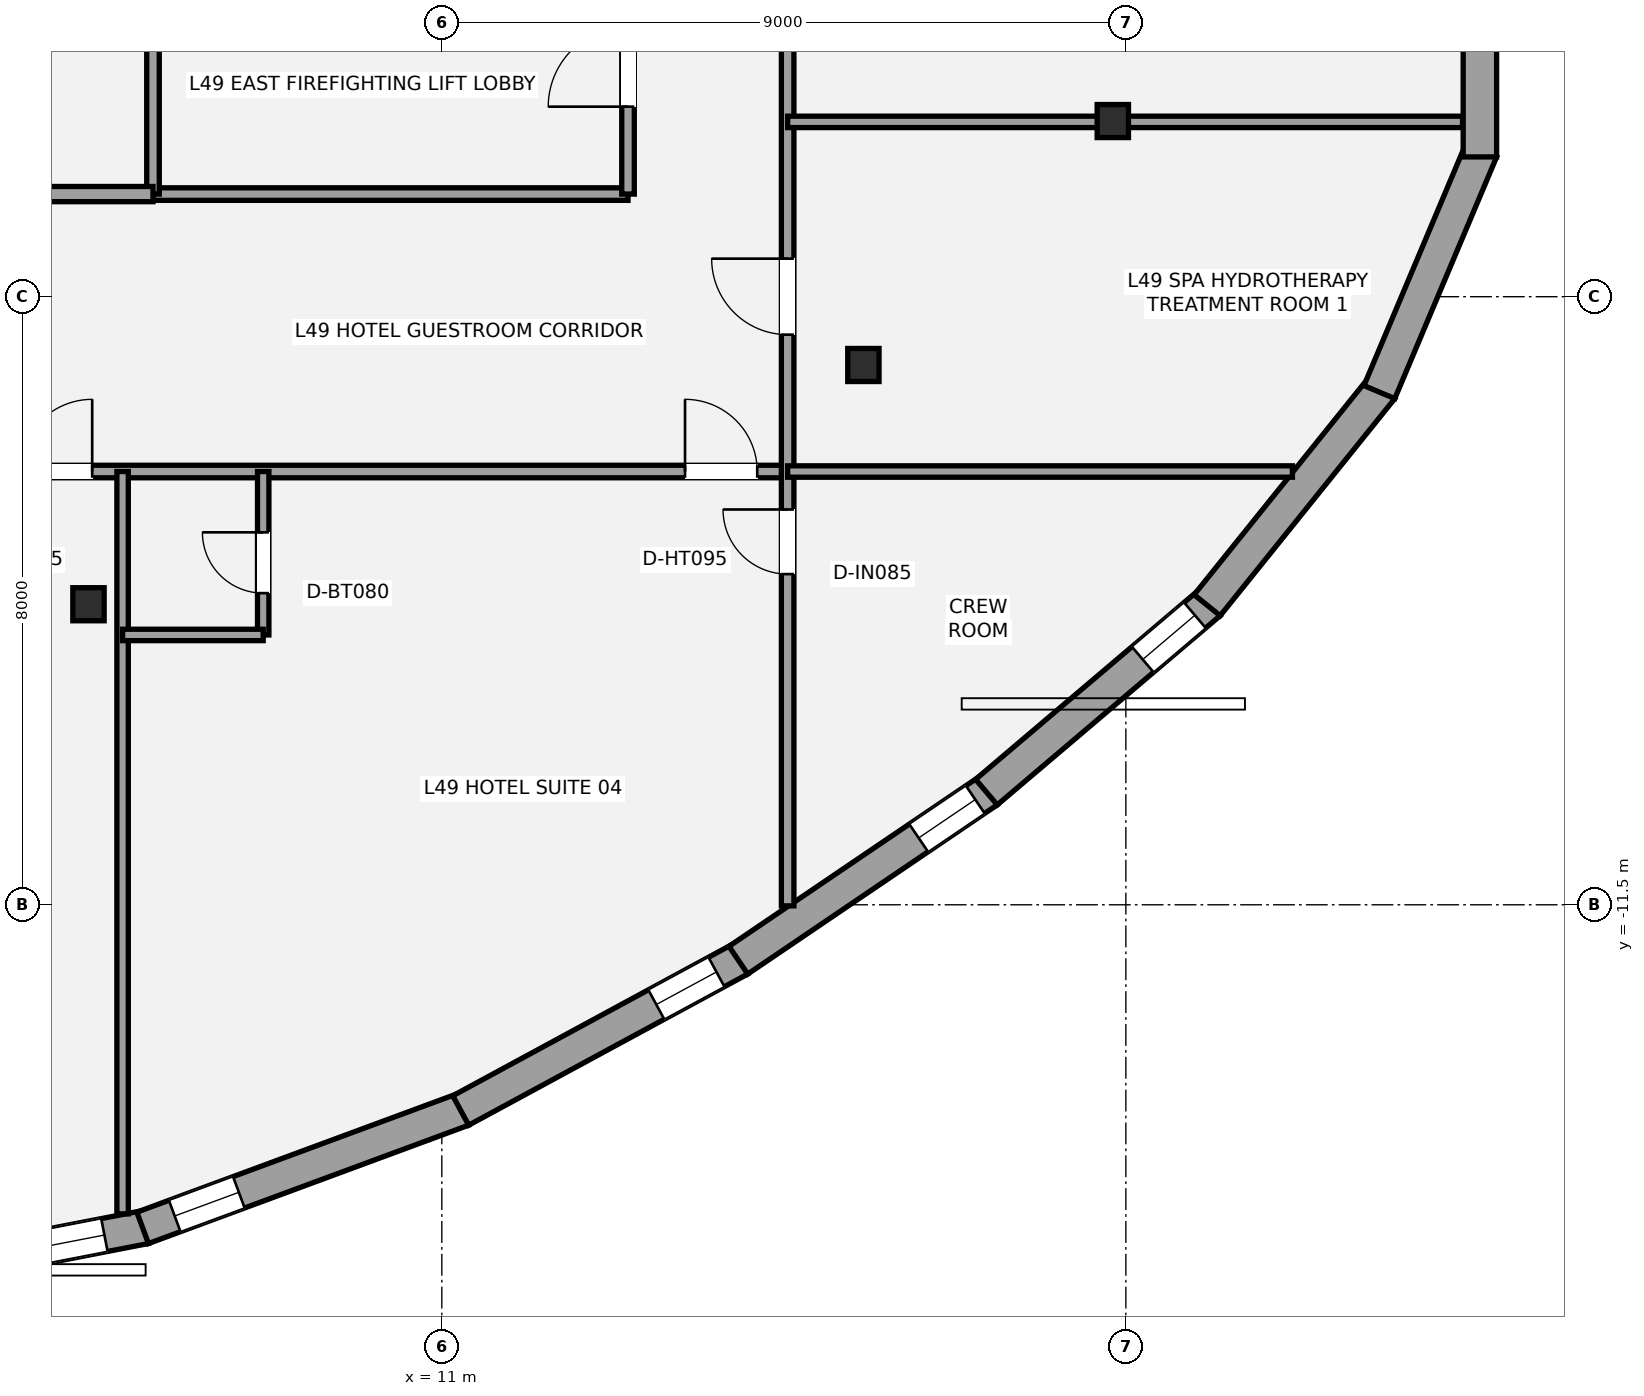
"""IFC4 building model, lengths in metres.
Left out: names, types, materials, properties, quantities, classifications, styles, units other than length and angle.
Written with IfcOpenShell. Run it as: python <this file> out.ifc"""

import sys

from ifc_helpers import new_model, si_unit, direction, frame, frame_2d, origin, origin_2d, place, context, subcontext, project, spatial, rectangle, i_section, extrude, element, fill, save


model = new_model("IFC4")
c1 = context("Model", 3, precision=1e-05, world=origin(), true_north=direction((0.0, 1.0)))
c2 = subcontext(c1, "Body", "Model", "MODEL_VIEW")
j1 = project(units=[si_unit("LENGTHUNIT", "METRE"), si_unit("PLANEANGLEUNIT", "RADIAN")], contexts=[c1])
p1 = place(None, origin())
s1 = spatial("IfcSite", under=j1, at=p1, CompositionType="ELEMENT")
p2 = place(p1, origin())
s2 = spatial("IfcBuilding", under=s1, at=p2, CompositionType="ELEMENT")
p3 = place(p2, frame((0.0, 0.0, 179.0)))
s3 = spatial("IfcBuildingStorey", under=s2, at=p3, CompositionType="ELEMENT", Elevation=179.0)
for number, where, z_axis, x_axis in (
    (1, (6.351, -7.546, 0.0), (0.0, 0.0, 1.0), (1.0, 0.0, 0.0)),
    (2, (16.547, -4.398, 0.0), (0.0, 0.0, 1.0), (1.0, 0.0, 0.0)),
    (3, (19.828, -1.189, 0.0), (0.0, 0.0, 1.0), (1.0, 0.0, 0.0)),
):
    element("IfcColumn", number, at=place(p3, frame(where, z_axis=z_axis, x_axis=x_axis)), inside=s3, PredefinedType="COLUMN", context=c2, shape_type="SweptSolid", body=[
        extrude(i_section(OverallWidth=0.412, OverallDepth=0.435, WebThickness=0.036, FlangeThickness=0.057, at=origin_2d()), origin(), (0.0, 0.0, 1.0), 3.2),
    ])
p4 = place(p3, frame((7.098, -15.741, 0.0), z_axis=(0.0, 0.0, 1.0), x_axis=(-0.981751851942, -0.190166509166, 0.0)))
e4 = element("IfcWall", 4, at=p4, inside=s3, PredefinedType="STANDARD", context=c2, shape_type="SweptSolid", body=[
    extrude(rectangle(XDim=4.777, YDim=0.44, at=frame_2d((2.389, 0.0))), origin(), (0.0, 0.0, 1.0), 2.315),
])
p5 = place(p4, frame((0.548, 0.0, 0.58)))
e5 = element("IfcOpeningElement", 5, at=p5, cuts=e4, PredefinedType="OPENING", context=c2, shape_type="SweptSolid", body=[
    extrude(rectangle(XDim=0.9, YDim=1.35, at=frame_2d((0.45, 0.675))), frame((0.0, 0.23, 0.0), z_axis=(0.0, -1.0, 0.0), x_axis=(1.0, 0.0, 0.0)), (0.0, 0.0, 1.0), 0.46),
])
p6 = place(p3, frame((11.277, -14.193, 0.0), z_axis=(0.0, 0.0, 1.0), x_axis=(-0.937993730452, -0.346652220004, 0.0)))
e6 = element("IfcWall", 6, at=p6, inside=s3, PredefinedType="STANDARD", context=c2, shape_type="SweptSolid", body=[
    extrude(rectangle(XDim=4.492, YDim=0.44, at=frame_2d((2.246, 0.0))), origin(), (0.0, 0.0, 1.0), 2.315),
])
p7 = place(p6, frame((3.143, 0.0, 0.58)))
e7 = element("IfcOpeningElement", 7, at=p7, cuts=e6, PredefinedType="OPENING", context=c2, shape_type="SweptSolid", body=[
    extrude(rectangle(XDim=0.9, YDim=1.35, at=frame_2d((0.45, 0.675))), frame((0.0, 0.23, 0.0), z_axis=(0.0, -1.0, 0.0), x_axis=(1.0, 0.0, 0.0)), (0.0, 0.0, 1.0), 0.46),
])
p8 = place(p3, frame((14.92, -12.218, 0.0), z_axis=(0.0, 0.0, 1.0), x_axis=(-0.879306250646, -0.476256776933, 0.0)))
e8 = element("IfcWall", 8, at=p8, inside=s3, PredefinedType="STANDARD", context=c2, shape_type="SweptSolid", body=[
    extrude(rectangle(XDim=4.175, YDim=0.44, at=frame_2d((2.088, 0.0))), origin(), (0.0, 0.0, 1.0), 2.315),
])
p9 = place(p8, frame((0.349, 0.0, 0.58)))
e9 = element("IfcOpeningElement", 9, at=p9, cuts=e8, PredefinedType="OPENING", context=c2, shape_type="SweptSolid", body=[
    extrude(rectangle(XDim=0.9, YDim=1.35, at=frame_2d((0.45, 0.675))), frame((0.0, 0.23, 0.0), z_axis=(0.0, -1.0, 0.0), x_axis=(1.0, 0.0, 0.0)), (0.0, 0.0, 1.0), 0.46),
])
p10 = place(p3, frame((18.185, -10.003, 0.0), z_axis=(0.0, 0.0, 1.0), x_axis=(-0.827725942945, -0.561132572015, 0.0)))
e10 = element("IfcWall", 10, at=p10, inside=s3, PredefinedType="STANDARD", context=c2, shape_type="SweptSolid", body=[
    extrude(rectangle(XDim=3.966, YDim=0.44, at=frame_2d((1.983, 0.0))), origin(), (0.0, 0.0, 1.0), 2.315),
])
p11 = place(p10, frame((0.2, 0.0, 0.58)))
e11 = element("IfcOpeningElement", 11, at=p11, cuts=e10, PredefinedType="OPENING", context=c2, shape_type="SweptSolid", body=[
    extrude(rectangle(XDim=0.9, YDim=1.35, at=frame_2d((0.45, 0.675))), frame((0.0, 0.23, 0.0), z_axis=(0.0, -1.0, 0.0), x_axis=(1.0, 0.0, 0.0)), (0.0, 0.0, 1.0), 0.46),
])
p12 = place(p3, frame((21.099, -7.529, 0.0), z_axis=(0.0, 0.0, 1.0), x_axis=(-0.762499647343, -0.646988630349, 0.0)))
e12 = element("IfcWall", 12, at=p12, inside=s3, PredefinedType="STANDARD", context=c2, shape_type="SweptSolid", body=[
    extrude(rectangle(XDim=3.847, YDim=0.44, at=frame_2d((1.923, 0.0))), origin(), (0.0, 0.0, 1.0), 2.315),
])
p13 = place(p12, frame((0.25, 0.0, 0.58)))
e13 = element("IfcOpeningElement", 13, at=p13, cuts=e12, PredefinedType="OPENING", context=c2, shape_type="SweptSolid", body=[
    extrude(rectangle(XDim=0.9, YDim=1.35, at=frame_2d((0.45, 0.675))), frame((0.0, 0.23, 0.0), z_axis=(0.0, -1.0, 0.0), x_axis=(1.0, 0.0, 0.0)), (0.0, 0.0, 1.0), 0.46),
])
p14 = place(p3, frame((23.367, -4.702, 0.0), z_axis=(0.0, 0.0, 1.0), x_axis=(-0.626642586146, -0.779306787618, 0.0)))
e14 = element("IfcWall", 14, at=p14, inside=s3, PredefinedType="STANDARD", context=c2, shape_type="SweptSolid", body=[
    extrude(rectangle(XDim=3.665, YDim=0.44, at=frame_2d((1.833, 0.0))), origin(), (0.0, 0.0, 1.0), 2.315),
])
p15 = place(p3, frame((24.675, -1.576, 0.0), z_axis=(0.0, 0.0, 1.0), x_axis=(-0.388360687569, -0.9215074478, 0.0)))
e15 = element("IfcWall", 15, at=p15, inside=s3, PredefinedType="STANDARD", context=c2, shape_type="SweptSolid", body=[
    extrude(rectangle(XDim=3.45, YDim=0.44, at=frame_2d((1.725, 0.0))), origin(), (0.0, 0.0, 1.0), 2.315),
])
p16 = place(p3, frame((24.658, 1.661, 0.0), z_axis=(0.0, 0.0, 1.0), x_axis=(0.0, -1.0, 0.0)))
e16 = element("IfcWall", 16, at=p16, inside=s3, PredefinedType="STANDARD", context=c2, shape_type="SweptSolid", body=[
    extrude(rectangle(XDim=3.322, YDim=0.44, at=frame_2d((1.661, 0.0))), origin(), (0.0, 0.0, 1.0), 2.315),
])
p17 = place(p3, frame((7.2, -2.15, 0.0), z_axis=(0.0, 0.0, 1.0), x_axis=(1.0, 0.0, 0.0)))
e17 = element("IfcWall", 17, at=p17, inside=s3, PredefinedType="PARTITIONING", context=c2, shape_type="SweptSolid", body=[
    extrude(rectangle(XDim=6.25, YDim=0.165, at=frame_2d((3.125, 0.0))), origin(), (0.0, 0.0, 1.0), 3.02),
])
p18 = place(p3, frame((7.2, -2.15, 0.0), z_axis=(0.0, 0.0, 1.0), x_axis=(0.0, 1.0, 0.0)))
e18 = element("IfcWall", 18, at=p18, inside=s3, PredefinedType="PARTITIONING", context=c2, shape_type="SweptSolid", body=[
    extrude(rectangle(XDim=3.4, YDim=0.165, at=frame_2d((1.7, 0.0))), origin(), (0.0, 0.0, 1.0), 2.473),
])
p19 = place(p3, frame((13.45, -2.15, 0.0), z_axis=(0.0, 0.0, 1.0), x_axis=(0.0, 1.0, 0.0)))
e19 = element("IfcWall", 19, at=p19, inside=s3, PredefinedType="PARTITIONING", context=c2, shape_type="SweptSolid", body=[
    extrude(rectangle(XDim=3.4, YDim=0.165, at=frame_2d((1.7, 0.0))), origin(), (0.0, 0.0, 1.0), 2.473),
])
p20 = place(p19, frame((1.15, 0.0, 0.0)))
e20 = element("IfcOpeningElement", 20, at=p20, cuts=e19, PredefinedType="OPENING", context=c2, shape_type="SweptSolid", body=[
    extrude(rectangle(XDim=1.05, YDim=2.15, at=frame_2d((0.525, 1.075))), frame((0.0, 0.093, 0.0), z_axis=(0.0, -1.0, 0.0), x_axis=(1.0, 0.0, 0.0)), (0.0, 0.0, 1.0), 0.185),
])
p21 = place(p3, frame((4.95, -2.15, 0.0), z_axis=(0.0, 0.0, 1.0), x_axis=(1.0, 0.0, 0.0)))
e21 = element("IfcWall", 21, at=p21, inside=s3, PredefinedType="SOLIDWALL", context=c2, shape_type="SweptSolid", body=[
    extrude(rectangle(XDim=2.25, YDim=0.2, at=frame_2d((1.125, 0.0))), origin(), (0.0, 0.0, 1.0), 3.02),
])
p22 = place(p3, frame((-15.55, -5.8, 0.0), z_axis=(0.0, 0.0, 1.0), x_axis=(1.0, 0.0, 0.0)))
e22 = element("IfcWall", 22, at=p22, inside=s3, PredefinedType="PARTITIONING", context=c2, shape_type="SweptSolid", body=[
    extrude(rectangle(XDim=31.1, YDim=0.165, at=frame_2d((15.55, 0.0))), origin(), (0.0, 0.0, 1.0), 2.398),
])
p23 = place(p22, frame((5.4, 0.0, 0.0)))
e23 = element("IfcOpeningElement", 23, at=p23, cuts=e22, PredefinedType="OPENING", context=c2, shape_type="SweptSolid", body=[
    extrude(rectangle(XDim=0.95, YDim=2.15, at=frame_2d((0.475, 1.075))), frame((0.0, 0.093, 0.0), z_axis=(0.0, -1.0, 0.0), x_axis=(1.0, 0.0, 0.0)), (0.0, 0.0, 1.0), 0.185),
])
p24 = place(p22, frame((13.2, 0.0, 0.0)))
e24 = element("IfcOpeningElement", 24, at=p24, cuts=e22, PredefinedType="OPENING", context=c2, shape_type="SweptSolid", body=[
    extrude(rectangle(XDim=0.95, YDim=2.15, at=frame_2d((0.475, 1.075))), frame((0.0, 0.093, 0.0), z_axis=(0.0, -1.0, 0.0), x_axis=(1.0, 0.0, 0.0)), (0.0, 0.0, 1.0), 0.185),
])
p25 = place(p22, frame((21.0, 0.0, 0.0)))
e25 = element("IfcOpeningElement", 25, at=p25, cuts=e22, PredefinedType="OPENING", context=c2, shape_type="SweptSolid", body=[
    extrude(rectangle(XDim=0.95, YDim=2.15, at=frame_2d((0.475, 1.075))), frame((0.0, 0.093, 0.0), z_axis=(0.0, -1.0, 0.0), x_axis=(1.0, 0.0, 0.0)), (0.0, 0.0, 1.0), 0.185),
])
p26 = place(p22, frame((29.75, 0.0, 0.0)))
e26 = element("IfcOpeningElement", 26, at=p26, cuts=e22, PredefinedType="OPENING", context=c2, shape_type="SweptSolid", body=[
    extrude(rectangle(XDim=0.95, YDim=2.15, at=frame_2d((0.475, 1.075))), frame((0.0, 0.093, 0.0), z_axis=(0.0, -1.0, 0.0), x_axis=(1.0, 0.0, 0.0)), (0.0, 0.0, 1.0), 0.185),
])
p27 = place(p3, frame((15.55, -11.514, 0.0), z_axis=(0.0, 0.0, 1.0), x_axis=(0.0, 1.0, 0.0)))
e27 = element("IfcWall", 27, at=p27, inside=s3, PredefinedType="PARTITIONING", context=c2, shape_type="SweptSolid", body=[
    extrude(rectangle(XDim=19.064, YDim=0.165, at=frame_2d((9.532, 0.0))), origin(), (0.0, 0.0, 1.0), 2.473),
])
p28 = place(p27, frame((4.365, 0.0, 0.0)))
e28 = element("IfcOpeningElement", 28, at=p28, cuts=e27, PredefinedType="OPENING", context=c2, shape_type="SweptSolid", body=[
    extrude(rectangle(XDim=0.85, YDim=2.1, at=frame_2d((0.425, 1.05))), frame((0.0, 0.093, 0.0), z_axis=(0.0, -1.0, 0.0), x_axis=(1.0, 0.0, 0.0)), (0.0, 0.0, 1.0), 0.185),
])
p29 = place(p27, frame((7.515, 0.0, 0.0)))
e29 = element("IfcOpeningElement", 29, at=p29, cuts=e27, PredefinedType="OPENING", context=c2, shape_type="SweptSolid", body=[
    extrude(rectangle(XDim=1.0, YDim=2.15, at=frame_2d((0.5, 1.075))), frame((0.0, 0.093, 0.0), z_axis=(0.0, -1.0, 0.0), x_axis=(1.0, 0.0, 0.0)), (0.0, 0.0, 1.0), 0.185),
])
p30 = place(p27, frame((11.915, 0.0, 0.0)))
e30 = element("IfcOpeningElement", 30, at=p30, cuts=e27, PredefinedType="OPENING", context=c2, shape_type="SweptSolid", body=[
    extrude(rectangle(XDim=1.0, YDim=2.15, at=frame_2d((0.5, 1.075))), frame((0.0, 0.093, 0.0), z_axis=(0.0, -1.0, 0.0), x_axis=(1.0, 0.0, 0.0)), (0.0, 0.0, 1.0), 0.185),
])
p31 = place(p27, frame((16.29, 0.0, 0.0)))
e31 = element("IfcOpeningElement", 31, at=p31, cuts=e27, PredefinedType="OPENING", context=c2, shape_type="SweptSolid", body=[
    extrude(rectangle(XDim=1.0, YDim=2.15, at=frame_2d((0.5, 1.075))), frame((0.0, 0.093, 0.0), z_axis=(0.0, -1.0, 0.0), x_axis=(1.0, 0.0, 0.0)), (0.0, 0.0, 1.0), 0.185),
])
p32 = place(p3, frame((15.55, -5.8, 0.0), z_axis=(0.0, 0.0, 1.0), x_axis=(1.0, 0.0, 0.0)))
e32 = element("IfcWall", 32, at=p32, inside=s3, PredefinedType="PLUMBINGWALL", context=c2, shape_type="SweptSolid", body=[
    extrude(rectangle(XDim=6.642, YDim=0.15, at=frame_2d((3.321, 0.0))), origin(), (0.0, 0.0, 1.0), 2.473),
])
p33 = place(p3, frame((6.8, -15.566, 0.0), z_axis=(0.0, 0.0, 1.0), x_axis=(0.0, 1.0, 0.0)))
e33 = element("IfcWall", 33, at=p33, inside=s3, PredefinedType="PLUMBINGWALL", context=c2, shape_type="SweptSolid", body=[
    extrude(rectangle(XDim=9.766, YDim=0.15, at=frame_2d((4.883, 0.0))), origin(), (0.0, 0.0, 1.0), 2.473),
])
p34 = place(p3, frame((8.65, -7.95, 0.0), z_axis=(0.0, 0.0, 1.0), x_axis=(0.0, 1.0, 0.0)))
e34 = element("IfcWall", 34, at=p34, inside=s3, PredefinedType="PLUMBINGWALL", context=c2, shape_type="SweptSolid", body=[
    extrude(rectangle(XDim=2.15, YDim=0.15, at=frame_2d((1.075, 0.0))), origin(), (0.0, 0.0, 1.0), 3.02),
])
p35 = place(p34, frame((0.55, 0.0, 0.0)))
e35 = element("IfcOpeningElement", 35, at=p35, cuts=e34, PredefinedType="OPENING", context=c2, shape_type="SweptSolid", body=[
    extrude(rectangle(XDim=0.8, YDim=2.1, at=frame_2d((0.4, 1.05))), frame((0.0, 0.085, 0.0), z_axis=(0.0, -1.0, 0.0), x_axis=(1.0, 0.0, 0.0)), (0.0, 0.0, 1.0), 0.17),
])
p36 = place(p3, frame((6.8, -7.95, 0.0), z_axis=(0.0, 0.0, 1.0), x_axis=(1.0, 0.0, 0.0)))
e36 = element("IfcWall", 36, at=p36, inside=s3, PredefinedType="PLUMBINGWALL", context=c2, shape_type="SweptSolid", body=[
    extrude(rectangle(XDim=1.85, YDim=0.15, at=frame_2d((0.925, 0.0))), origin(), (0.0, 0.0, 1.0), 3.02),
])
p37 = place(p3, frame((15.55, -1.2, 0.0), z_axis=(0.0, 0.0, 1.0), x_axis=(1.0, 0.0, 0.0)))
e37 = element("IfcWall", 37, at=p37, inside=s3, PredefinedType="PLUMBINGWALL", context=c2, shape_type="SweptSolid", body=[
    extrude(rectangle(XDim=8.88, YDim=0.15, at=frame_2d((4.44, 0.0))), origin(), (0.0, 0.0, 1.0), 2.398),
])
p38 = place(p5, origin())
e38 = element("IfcWindow", 38, at=p38, inside=s3, PartitioningType="SINGLE_PANEL", PredefinedType="WINDOW", context=c2, shape_type="SweptSolid", body=[
    extrude(rectangle(XDim=0.9, YDim=1.35, at=frame_2d((0.45, 0.675))), frame((0.0, -0.01, 0.0), z_axis=(0.0, -1.0, 0.0), x_axis=(1.0, 0.0, 0.0)), (0.0, 0.0, 1.0), 0.06),
])
fill(e5, e38)
p39 = place(p7, origin())
e39 = element("IfcWindow", 39, at=p39, inside=s3, PartitioningType="SINGLE_PANEL", PredefinedType="WINDOW", context=c2, shape_type="SweptSolid", body=[
    extrude(rectangle(XDim=0.9, YDim=1.35, at=frame_2d((0.45, 0.675))), frame((0.0, -0.01, 0.0), z_axis=(0.0, -1.0, 0.0), x_axis=(1.0, 0.0, 0.0)), (0.0, 0.0, 1.0), 0.06),
])
fill(e7, e39)
p40 = place(p9, origin())
e40 = element("IfcWindow", 40, at=p40, inside=s3, PartitioningType="SINGLE_PANEL", PredefinedType="WINDOW", context=c2, shape_type="SweptSolid", body=[
    extrude(rectangle(XDim=0.9, YDim=1.35, at=frame_2d((0.45, 0.675))), frame((0.0, -0.01, 0.0), z_axis=(0.0, -1.0, 0.0), x_axis=(1.0, 0.0, 0.0)), (0.0, 0.0, 1.0), 0.06),
])
fill(e9, e40)
p41 = place(p11, origin())
e41 = element("IfcWindow", 41, at=p41, inside=s3, PartitioningType="SINGLE_PANEL", PredefinedType="WINDOW", context=c2, shape_type="SweptSolid", body=[
    extrude(rectangle(XDim=0.9, YDim=1.35, at=frame_2d((0.45, 0.675))), frame((0.0, -0.01, 0.0), z_axis=(0.0, -1.0, 0.0), x_axis=(1.0, 0.0, 0.0)), (0.0, 0.0, 1.0), 0.06),
])
fill(e11, e41)
p42 = place(p13, origin())
e42 = element("IfcWindow", 42, at=p42, inside=s3, PartitioningType="SINGLE_PANEL", PredefinedType="WINDOW", context=c2, shape_type="SweptSolid", body=[
    extrude(rectangle(XDim=0.9, YDim=1.35, at=frame_2d((0.45, 0.675))), frame((0.0, -0.01, 0.0), z_axis=(0.0, -1.0, 0.0), x_axis=(1.0, 0.0, 0.0)), (0.0, 0.0, 1.0), 0.06),
])
fill(e13, e42)
p43 = place(p20, origin())
e43 = element("IfcDoor", 43, at=p43, inside=s3, OperationType="SINGLE_SWING_LEFT", PredefinedType="DOOR", context=c2, shape_type="SweptSolid", body=[
    extrude(rectangle(XDim=1.05, YDim=2.15, at=frame_2d((0.525, 1.075))), frame((0.0, 0.025, 0.0), z_axis=(0.0, -1.0, 0.0), x_axis=(1.0, 0.0, 0.0)), (0.0, 0.0, 1.0), 0.05),
])
fill(e20, e43)
p44 = place(p28, origin())
e44 = element("IfcDoor", 44, at=p44, inside=s3, OperationType="SINGLE_SWING_RIGHT", PredefinedType="DOOR", context=c2, shape_type="SweptSolid", body=[
    extrude(rectangle(XDim=0.85, YDim=2.1, at=frame_2d((0.425, 1.05))), frame((0.0, 0.025, 0.0), z_axis=(0.0, -1.0, 0.0), x_axis=(1.0, 0.0, 0.0)), (0.0, 0.0, 1.0), 0.05),
])
fill(e28, e44)
p45 = place(p25, origin())
e45 = element("IfcDoor", 45, at=p45, inside=s3, OperationType="SINGLE_SWING_RIGHT", PredefinedType="DOOR", context=c2, shape_type="SweptSolid", body=[
    extrude(rectangle(XDim=0.95, YDim=2.15, at=frame_2d((0.475, 1.075))), frame((0.0, 0.025, 0.0), z_axis=(0.0, -1.0, 0.0), x_axis=(1.0, 0.0, 0.0)), (0.0, 0.0, 1.0), 0.05),
])
fill(e25, e45)
p46 = place(p26, origin())
e46 = element("IfcDoor", 46, at=p46, inside=s3, OperationType="SINGLE_SWING_LEFT", PredefinedType="DOOR", context=c2, shape_type="SweptSolid", body=[
    extrude(rectangle(XDim=0.95, YDim=2.15, at=frame_2d((0.475, 1.075))), frame((0.0, 0.025, 0.0), z_axis=(0.0, -1.0, 0.0), x_axis=(1.0, 0.0, 0.0)), (0.0, 0.0, 1.0), 0.05),
])
fill(e26, e46)
p47 = place(p35, origin())
e47 = element("IfcDoor", 47, at=p47, inside=s3, OperationType="SINGLE_SWING_RIGHT", PredefinedType="DOOR", context=c2, shape_type="SweptSolid", body=[
    extrude(rectangle(XDim=0.8, YDim=2.1, at=frame_2d((0.4, 1.05))), frame((0.0, 0.025, 0.0), z_axis=(0.0, -1.0, 0.0), x_axis=(1.0, 0.0, 0.0)), (0.0, 0.0, 1.0), 0.05),
])
fill(e35, e47)
p48 = place(p29, origin())
e48 = element("IfcDoor", 48, at=p48, inside=s3, OperationType="SINGLE_SWING_RIGHT", PredefinedType="DOOR", context=c2, shape_type="SweptSolid", body=[
    extrude(rectangle(XDim=1.0, YDim=2.15, at=frame_2d((0.5, 1.075))), frame((0.0, 0.025, 0.0), z_axis=(0.0, -1.0, 0.0), x_axis=(1.0, 0.0, 0.0)), (0.0, 0.0, 1.0), 0.05),
])
fill(e29, e48)
save(model, sys.argv[1])
